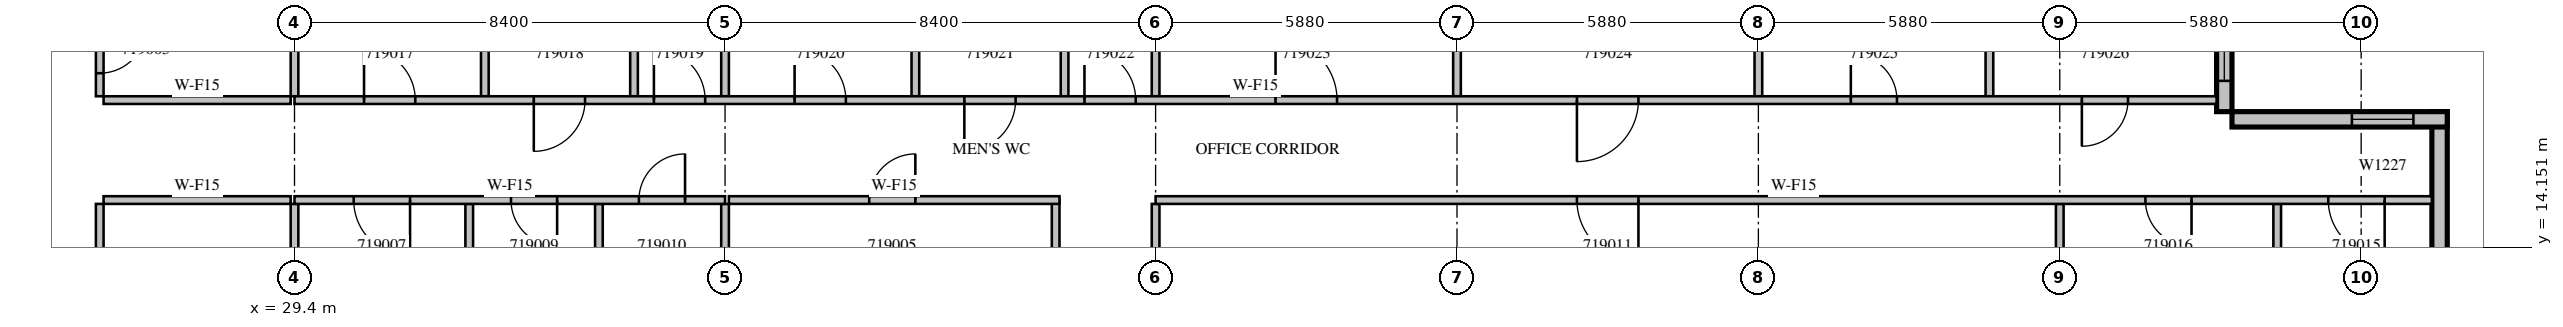
"""IFC4 building model, lengths in metres.
Left out: names, types, materials, properties, quantities, classifications, styles, units other than length and angle.
Written with IfcOpenShell. Run it as: python <this file> out.ifc"""

import sys

from ifc_helpers import new_model, si_unit, direction, frame, frame_2d, origin, place, context, subcontext, project, spatial, rectangle, extrude, source, transform, mapped, element, fill, save


model = new_model("IFC4")
c1 = context("Model", 3, precision=1e-05, world=origin(), true_north=direction((0.0, 1.0)))
c2 = subcontext(c1, "Body", "Model", "MODEL_VIEW")
j1 = project(units=[si_unit("LENGTHUNIT", "METRE"), si_unit("PLANEANGLEUNIT", "RADIAN")], contexts=[c1])
p1 = place(None, origin())
s1 = spatial("IfcSite", under=j1, at=p1, CompositionType="ELEMENT")
p2 = place(p1, origin())
s2 = spatial("IfcBuilding", under=s1, at=p2, CompositionType="ELEMENT")
p3 = place(p2, frame((0.0, 0.0, 90.9)))
s3 = spatial("IfcBuildingStorey", under=s2, at=p3, CompositionType="ELEMENT", Elevation=90.9)
m1 = source(origin(), c2, "Body", "SweptSolid", [
    extrude(rectangle(XDim=6.3, YDim=0.3, at=frame_2d((3.15, 0.0))), origin(), (0.0, 0.0, 1.0), 3.8),
])
p4 = place(p3, frame((71.25, 10.5, 0.0), z_axis=(0.0, 0.0, 1.0), x_axis=(0.0, 1.0, 0.0)))
e1 = element("IfcWall", 1, at=p4, inside=s3, PredefinedType="STANDARD", context=c2, shape_type="MappedRepresentation", body=[
    mapped(m1, transform((0.0, 0.0, 0.0), scale=1.0)),
])
m2 = source(origin(), c2, "Body", "SweptSolid", [
    extrude(rectangle(XDim=1.2, YDim=2.7, at=frame_2d((0.6, 1.35))), frame((0.0, 0.16, 0.0), z_axis=(0.0, -1.0, 0.0), x_axis=(1.0, 0.0, 0.0)), (0.0, 0.0, 1.0), 0.32),
])
p5 = place(p4, frame((1.062, 0.0, 0.6)))
e2 = element("IfcOpeningElement", 2, at=p5, cuts=e1, PredefinedType="OPENING", context=c2, shape_type="MappedRepresentation", body=[
    mapped(m2, transform((0.0, 0.0, 0.0), scale=1.0)),
])
m3 = source(origin(), c2, "Body", "SweptSolid", [
    extrude(rectangle(XDim=4.2, YDim=0.3, at=frame_2d((2.1, 0.0))), origin(), (0.0, 0.0, 1.0), 3.8),
])
p6 = place(p3, frame((71.4, 16.65, 0.0), z_axis=(0.0, 0.0, 1.0), x_axis=(-1.0, 0.0, 0.0)))
e3 = element("IfcWall", 3, at=p6, inside=s3, PredefinedType="STANDARD", context=c2, shape_type="MappedRepresentation", body=[
    mapped(m3, transform((0.0, 0.0, 0.0), scale=1.0)),
])
p7 = place(p6, frame((0.66, 0.0, 0.6)))
e4 = element("IfcOpeningElement", 4, at=p7, cuts=e3, PredefinedType="OPENING", context=c2, shape_type="MappedRepresentation", body=[
    mapped(m2, transform((0.0, 0.0, 0.0), scale=1.0)),
])
p8 = place(p3, frame((67.05, 16.8, 0.0), z_axis=(0.0, 0.0, 1.0), x_axis=(0.0, 1.0, 0.0)))
e5 = element("IfcWall", 5, at=p8, inside=s3, PredefinedType="STANDARD", context=c2, shape_type="MappedRepresentation", body=[
    mapped(m3, transform((0.0, 0.0, 0.0), scale=1.0)),
])
m4 = source(origin(), c2, "Body", "SweptSolid", [
    extrude(rectangle(XDim=3.0, YDim=2.7, at=frame_2d((1.5, 1.35))), frame((0.0, 0.16, 0.0), z_axis=(0.0, -1.0, 0.0), x_axis=(1.0, 0.0, 0.0)), (0.0, 0.0, 1.0), 0.32),
])
p9 = place(p8, frame((0.6, 0.0, 0.6)))
e6 = element("IfcOpeningElement", 6, at=p9, cuts=e5, PredefinedType="OPENING", context=c2, shape_type="MappedRepresentation", body=[
    mapped(m4, transform((0.0, 0.0, 0.0), scale=1.0)),
])
m5 = source(origin(), c2, "Body", "SweptSolid", [
    extrude(rectangle(XDim=11.925, YDim=0.15, at=frame_2d((5.963, 0.0))), origin(), (0.0, 0.0, 1.0), 3.8),
])
p10 = place(p3, frame((25.6, 15.0, 0.0), z_axis=(0.0, 0.0, 1.0), x_axis=(0.0, -1.0, 0.0)))
e7 = element("IfcWall", 7, at=p10, inside=s3, PredefinedType="PARTITIONING", context=c2, shape_type="MappedRepresentation", body=[
    mapped(m5, transform((0.0, 0.0, 0.0), scale=1.0)),
])
m6 = source(origin(), c2, "Body", "SweptSolid", [
    extrude(rectangle(XDim=0.9, YDim=2.1, at=frame_2d((0.45, 1.05))), frame((0.0, 0.085, 0.0), z_axis=(0.0, -1.0, 0.0), x_axis=(1.0, 0.0, 0.0)), (0.0, 0.0, 1.0), 0.17),
])
p11 = place(p10, frame((7.763, 0.0, 0.0)))
e8 = element("IfcOpeningElement", 8, at=p11, cuts=e7, PredefinedType="OPENING", context=c2, shape_type="MappedRepresentation", body=[
    mapped(m6, transform((0.0, 0.0, 0.0), scale=1.0)),
])
p12 = place(p10, frame((0.925, 0.0, 0.0)))
e9 = element("IfcOpeningElement", 9, at=p12, cuts=e7, PredefinedType="OPENING", context=c2, shape_type="MappedRepresentation", body=[
    mapped(m6, transform((0.0, 0.0, 0.0), scale=1.0)),
])
m7 = source(origin(), c2, "Body", "SweptSolid", [
    extrude(rectangle(XDim=3.6, YDim=0.15, at=frame_2d((1.8, 0.0))), origin(), (0.0, 0.0, 1.0), 3.8),
])
p13 = place(p3, frame((25.6, 20.7, 0.0), z_axis=(0.0, 0.0, 1.0), x_axis=(0.0, -1.0, 0.0)))
e10 = element("IfcWall", 10, at=p13, inside=s3, PredefinedType="PARTITIONING", context=c2, shape_type="MappedRepresentation", body=[
    mapped(m7, transform((0.0, 0.0, 0.0), scale=1.0)),
])
p14 = place(p13, frame((2.25, 0.0, 0.0)))
e11 = element("IfcOpeningElement", 11, at=p14, cuts=e10, PredefinedType="OPENING", context=c2, shape_type="MappedRepresentation", body=[
    mapped(m6, transform((0.0, 0.0, 0.0), scale=1.0)),
])
m8 = source(origin(), c2, "Body", "SweptSolid", [
    extrude(rectangle(XDim=3.65, YDim=0.15, at=frame_2d((1.825, 0.0))), origin(), (0.0, 0.0, 1.0), 3.8),
])
for number, where, z_axis, x_axis in (
    (12, (29.325, 15.075, 0.0), (0.0, 0.0, 1.0), (-1.0, 0.0, 0.0)),
    (13, (25.675, 17.025, 0.0), (0.0, 0.0, 1.0), (1.0, 0.0, 0.0)),
):
    element("IfcWall", number, at=place(p3, frame(where, z_axis=z_axis, x_axis=x_axis)), inside=s3, PredefinedType="PARTITIONING", context=c2, shape_type="MappedRepresentation", body=[
        mapped(m8, transform((0.0, 0.0, 0.0), scale=1.0)),
    ])
m9 = source(origin(), c2, "Body", "SweptSolid", [
    extrude(rectangle(XDim=3.901, YDim=0.15, at=frame_2d((1.95, 0.0))), origin(), (0.0, 0.0, 1.0), 3.8),
])
p15 = place(p3, frame((29.4, 11.099, 0.0), z_axis=(0.0, 0.0, 1.0), x_axis=(0.0, 1.0, 0.0)))
e14 = element("IfcWall", 14, at=p15, inside=s3, PredefinedType="PARTITIONING", context=c2, shape_type="MappedRepresentation", body=[
    mapped(m9, transform((0.0, 0.0, 0.0), scale=1.0)),
])
m10 = source(origin(), c2, "Body", "SweptSolid", [
    extrude(rectangle(XDim=2.701, YDim=0.15, at=frame_2d((1.351, 0.0))), origin(), (0.0, 0.0, 1.0), 3.8),
])
p16 = place(p3, frame((29.4, 17.1, 0.0), z_axis=(0.0, 0.0, 1.0), x_axis=(0.0, 1.0, 0.0)))
e15 = element("IfcWall", 15, at=p16, inside=s3, PredefinedType="PARTITIONING", context=c2, shape_type="MappedRepresentation", body=[
    mapped(m10, transform((0.0, 0.0, 0.0), scale=1.0)),
])
m11 = source(origin(), c2, "Body", "SweptSolid", [
    extrude(rectangle(XDim=3.175, YDim=0.15, at=frame_2d((1.587, 0.0))), origin(), (0.0, 0.0, 1.0), 3.8),
])
p17 = place(p3, frame((44.25, 11.9, 0.0), z_axis=(0.0, 0.0, 1.0), x_axis=(0.0, 1.0, 0.0)))
e16 = element("IfcWall", 16, at=p17, inside=s3, PredefinedType="PARTITIONING", context=c2, shape_type="MappedRepresentation", body=[
    mapped(m11, transform((0.0, 0.0, 0.0), scale=1.0)),
])
m12 = source(origin(), c2, "Body", "SweptSolid", [
    extrude(rectangle(XDim=6.45, YDim=0.15, at=frame_2d((3.225, 0.0))), origin(), (0.0, 0.0, 1.0), 3.8),
])
p18 = place(p3, frame((44.325, 15.075, 0.0), z_axis=(0.0, 0.0, 1.0), x_axis=(-1.0, 0.0, 0.0)))
e17 = element("IfcWall", 17, at=p18, inside=s3, PredefinedType="PARTITIONING", context=c2, shape_type="MappedRepresentation", body=[
    mapped(m12, transform((0.0, 0.0, 0.0), scale=1.0)),
])
p19 = place(p18, frame((2.812, 0.0, 0.0)))
e18 = element("IfcOpeningElement", 18, at=p19, cuts=e17, PredefinedType="OPENING", context=c2, shape_type="MappedRepresentation", body=[
    mapped(m6, transform((0.0, 0.0, 0.0), scale=1.0)),
])
m13 = source(origin(), c2, "Body", "SweptSolid", [
    extrude(rectangle(XDim=3.75, YDim=0.15, at=frame_2d((1.875, 0.0))), origin(), (0.0, 0.0, 1.0), 3.8),
])
for number, where, z_axis, x_axis in (
    (19, (32.809, 11.25, 0.0), (0.0, 0.0, 1.0), (0.0, 1.0, 0.0)),
    (20, (35.339, 11.25, 0.0), (0.0, 0.0, 1.0), (0.0, 1.0, 0.0)),
    (21, (37.8, 11.25, 0.0), (0.0, 0.0, 1.0), (0.0, 1.0, 0.0)),
    (22, (68.082, 11.25, 0.0), (0.0, 0.0, 1.0), (0.0, 1.0, 0.0)),
    (23, (46.2, 11.25, 0.0), (0.0, 0.0, 1.0), (0.0, 1.0, 0.0)),
    (24, (63.84, 11.25, 0.0), (0.0, 0.0, 1.0), (0.0, 1.0, 0.0)),
):
    element("IfcWall", number, at=place(p3, frame(where, z_axis=z_axis, x_axis=x_axis)), inside=s3, PredefinedType="PARTITIONING", context=c2, shape_type="MappedRepresentation", body=[
        mapped(m13, transform((0.0, 0.0, 0.0), scale=1.0)),
    ])
for number, where, z_axis, x_axis in (
    (25, (33.113, 20.7, 0.0), (0.0, 0.0, 1.0), (0.0, -1.0, 0.0)),
    (26, (36.024, 20.7, 0.0), (0.0, 0.0, 1.0), (0.0, -1.0, 0.0)),
    (27, (41.513, 20.7, 0.0), (0.0, 0.0, 1.0), (0.0, -1.0, 0.0)),
):
    element("IfcWall", number, at=place(p3, frame(where, z_axis=z_axis, x_axis=x_axis)), inside=s3, PredefinedType="PARTITIONING", context=c2, shape_type="MappedRepresentation", body=[
        mapped(m7, transform((0.0, 0.0, 0.0), scale=1.0)),
    ])
p20 = place(p3, frame((44.424, 18.695, 0.0), z_axis=(0.0, 0.0, 1.0), x_axis=(0.0, -1.0, 0.0)))
e28 = element("IfcWall", 28, at=p20, inside=s3, PredefinedType="PARTITIONING", context=c2, shape_type="SweptSolid", body=[
    extrude(rectangle(XDim=1.595, YDim=0.15, at=frame_2d((0.797, 0.0))), origin(), (0.0, 0.0, 1.0), 3.8),
])
p21 = place(p3, frame((52.08, 19.801, 0.0), z_axis=(0.0, 0.0, 1.0), x_axis=(0.0, -1.0, 0.0)))
e29 = element("IfcWall", 29, at=p21, inside=s3, PredefinedType="PARTITIONING", context=c2, shape_type="MappedRepresentation", body=[
    mapped(m10, transform((0.0, 0.0, 0.0), scale=1.0)),
])
p22 = place(p3, frame((62.468, 20.7, 0.0), z_axis=(0.0, 0.0, 1.0), x_axis=(0.0, -1.0, 0.0)))
e30 = element("IfcWall", 30, at=p22, inside=s3, PredefinedType="PARTITIONING", context=c2, shape_type="MappedRepresentation", body=[
    mapped(m7, transform((0.0, 0.0, 0.0), scale=1.0)),
])
for number, where, z_axis, x_axis in (
    (31, (37.8, 17.1, 0.0), (0.0, 0.0, 1.0), (0.0, 1.0, 0.0)),
    (32, (46.2, 17.1, 0.0), (0.0, 0.0, 1.0), (0.0, 1.0, 0.0)),
    (33, (57.96, 17.1, 0.0), (0.0, 0.0, 1.0), (0.0, 1.0, 0.0)),
):
    element("IfcWall", number, at=place(p3, frame(where, z_axis=z_axis, x_axis=x_axis)), inside=s3, PredefinedType="PARTITIONING", context=c2, shape_type="MappedRepresentation", body=[
        mapped(m10, transform((0.0, 0.0, 0.0), scale=1.0)),
    ])
m14 = source(origin(), c2, "Body", "SweptSolid", [
    extrude(rectangle(XDim=8.4, YDim=0.15, at=frame_2d((4.2, 0.0))), origin(), (0.0, 0.0, 1.0), 3.8),
])
p23 = place(p3, frame((37.8, 15.075, 0.0), z_axis=(0.0, 0.0, 1.0), x_axis=(-1.0, 0.0, 0.0)))
e34 = element("IfcWall", 34, at=p23, inside=s3, PredefinedType="PARTITIONING", context=c2, shape_type="MappedRepresentation", body=[
    mapped(m14, transform((0.0, 0.0, 0.0), scale=1.0)),
])
m15 = source(origin(), c2, "Body", "SweptSolid", [
    extrude(rectangle(XDim=1.1, YDim=2.1, at=frame_2d((0.55, 1.05))), frame((0.0, 0.085, 0.0), z_axis=(0.0, -1.0, 0.0), x_axis=(1.0, 0.0, 0.0)), (0.0, 0.0, 1.0), 0.17),
])
p24 = place(p23, frame((6.146, 0.0, 0.0)))
e35 = element("IfcOpeningElement", 35, at=p24, cuts=e34, PredefinedType="OPENING", context=c2, shape_type="MappedRepresentation", body=[
    mapped(m15, transform((0.0, 0.0, 0.0), scale=1.0)),
])
p25 = place(p23, frame((3.276, 0.0, 0.0)))
e36 = element("IfcOpeningElement", 36, at=p25, cuts=e34, PredefinedType="OPENING", context=c2, shape_type="MappedRepresentation", body=[
    mapped(m6, transform((0.0, 0.0, 0.0), scale=1.0)),
])
p26 = place(p23, frame((0.781, 0.0, 0.0)))
e37 = element("IfcOpeningElement", 37, at=p26, cuts=e34, PredefinedType="OPENING", context=c2, shape_type="MappedRepresentation", body=[
    mapped(m6, transform((0.0, 0.0, 0.0), scale=1.0)),
])
m16 = source(origin(), c2, "Body", "SweptSolid", [
    extrude(rectangle(XDim=24.9, YDim=0.15, at=frame_2d((12.45, 0.0))), origin(), (0.0, 0.0, 1.0), 3.8),
])
p27 = place(p3, frame((71.1, 15.075, 0.0), z_axis=(0.0, 0.0, 1.0), x_axis=(-1.0, 0.0, 0.0)))
e38 = element("IfcWall", 38, at=p27, inside=s3, PredefinedType="PARTITIONING", context=c2, shape_type="MappedRepresentation", body=[
    mapped(m16, transform((0.0, 0.0, 0.0), scale=1.0)),
])
m17 = source(origin(), c2, "Body", "SweptSolid", [
    extrude(rectangle(XDim=1.2, YDim=2.1, at=frame_2d((0.6, 1.05))), frame((0.0, 0.085, 0.0), z_axis=(0.0, -1.0, 0.0), x_axis=(1.0, 0.0, 0.0)), (0.0, 0.0, 1.0), 0.17),
])
p28 = place(p27, frame((15.48, 0.0, 0.0)))
e39 = element("IfcOpeningElement", 39, at=p28, cuts=e38, PredefinedType="OPENING", context=c2, shape_type="MappedRepresentation", body=[
    mapped(m17, transform((0.0, 0.0, 0.0), scale=1.0)),
])
p29 = place(p27, frame((0.921, 0.0, 0.0)))
e40 = element("IfcOpeningElement", 40, at=p29, cuts=e38, PredefinedType="OPENING", context=c2, shape_type="MappedRepresentation", body=[
    mapped(m15, transform((0.0, 0.0, 0.0), scale=1.0)),
])
p30 = place(p27, frame((4.689, 0.0, 0.0)))
e41 = element("IfcOpeningElement", 41, at=p30, cuts=e38, PredefinedType="OPENING", context=c2, shape_type="MappedRepresentation", body=[
    mapped(m6, transform((0.0, 0.0, 0.0), scale=1.0)),
])
m18 = source(origin(), c2, "Body", "SweptSolid", [
    extrude(rectangle(XDim=37.5, YDim=0.15, at=frame_2d((18.75, 0.0))), origin(), (0.0, 0.0, 1.0), 3.8),
])
p31 = place(p3, frame((29.4, 17.025, 0.0), z_axis=(0.0, 0.0, 1.0), x_axis=(1.0, 0.0, 0.0)))
e42 = element("IfcWall", 42, at=p31, inside=s3, PredefinedType="PARTITIONING", context=c2, shape_type="MappedRepresentation", body=[
    mapped(m18, transform((0.0, 0.0, 0.0), scale=1.0)),
])
m19 = source(origin(), c2, "Body", "SweptSolid", [
    extrude(rectangle(XDim=1.0, YDim=2.1, at=frame_2d((0.5, 1.05))), frame((0.0, 0.085, 0.0), z_axis=(0.0, -1.0, 0.0), x_axis=(1.0, 0.0, 0.0)), (0.0, 0.0, 1.0), 0.17),
])
p32 = place(p31, frame((1.357, 0.0, 0.0)))
e43 = element("IfcOpeningElement", 43, at=p32, cuts=e42, PredefinedType="OPENING", context=c2, shape_type="MappedRepresentation", body=[
    mapped(m19, transform((0.0, 0.0, 0.0), scale=1.0)),
])
p33 = place(p31, frame((4.669, 0.0, 0.0)))
e44 = element("IfcOpeningElement", 44, at=p33, cuts=e42, PredefinedType="OPENING", context=c2, shape_type="MappedRepresentation", body=[
    mapped(m19, transform((0.0, 0.0, 0.0), scale=1.0)),
])
p34 = place(p31, frame((7.012, 0.0, 0.0)))
e45 = element("IfcOpeningElement", 45, at=p34, cuts=e42, PredefinedType="OPENING", context=c2, shape_type="MappedRepresentation", body=[
    mapped(m19, transform((0.0, 0.0, 0.0), scale=1.0)),
])
p35 = place(p31, frame((9.757, 0.0, 0.0)))
e46 = element("IfcOpeningElement", 46, at=p35, cuts=e42, PredefinedType="OPENING", context=c2, shape_type="MappedRepresentation", body=[
    mapped(m19, transform((0.0, 0.0, 0.0), scale=1.0)),
])
p36 = place(p31, frame((13.069, 0.0, 0.0)))
e47 = element("IfcOpeningElement", 47, at=p36, cuts=e42, PredefinedType="OPENING", context=c2, shape_type="MappedRepresentation", body=[
    mapped(m19, transform((0.0, 0.0, 0.0), scale=1.0)),
])
p37 = place(p31, frame((15.412, 0.0, 0.0)))
e48 = element("IfcOpeningElement", 48, at=p37, cuts=e42, PredefinedType="OPENING", context=c2, shape_type="MappedRepresentation", body=[
    mapped(m19, transform((0.0, 0.0, 0.0), scale=1.0)),
])
p38 = place(p31, frame((19.14, 0.0, 0.0)))
e49 = element("IfcOpeningElement", 49, at=p38, cuts=e42, PredefinedType="OPENING", context=c2, shape_type="MappedRepresentation", body=[
    mapped(m17, transform((0.0, 0.0, 0.0), scale=1.0)),
])
p39 = place(p31, frame((25.02, 0.0, 0.0)))
e50 = element("IfcOpeningElement", 50, at=p39, cuts=e42, PredefinedType="OPENING", context=c2, shape_type="MappedRepresentation", body=[
    mapped(m17, transform((0.0, 0.0, 0.0), scale=1.0)),
])
p40 = place(p31, frame((30.364, 0.0, 0.0)))
e51 = element("IfcOpeningElement", 51, at=p40, cuts=e42, PredefinedType="OPENING", context=c2, shape_type="MappedRepresentation", body=[
    mapped(m6, transform((0.0, 0.0, 0.0), scale=1.0)),
])
p41 = place(p31, frame((34.871, 0.0, 0.0)))
e52 = element("IfcOpeningElement", 52, at=p41, cuts=e42, PredefinedType="OPENING", context=c2, shape_type="MappedRepresentation", body=[
    mapped(m6, transform((0.0, 0.0, 0.0), scale=1.0)),
])
m20 = source(origin(), c2, "Body", "SweptSolid", [
    extrude(rectangle(XDim=1.2, YDim=2.7, at=frame_2d((0.6, 1.35))), frame((0.0, 0.03, 0.0), z_axis=(0.0, -1.0, 0.0), x_axis=(1.0, 0.0, 0.0)), (0.0, 0.0, 1.0), 0.06),
])
p42 = place(p7, origin())
e53 = element("IfcWindow", 53, at=p42, inside=s3, PartitioningType="SINGLE_PANEL", PredefinedType="WINDOW", context=c2, shape_type="MappedRepresentation", body=[
    mapped(m20, transform((0.0, 0.0, 0.0), scale=1.0)),
])
fill(e4, e53)
m21 = source(origin(), c2, "Body", "SweptSolid", [
    extrude(rectangle(XDim=3.0, YDim=2.7, at=frame_2d((1.5, 1.35))), frame((0.0, 0.03, 0.0), z_axis=(0.0, -1.0, 0.0), x_axis=(1.0, 0.0, 0.0)), (0.0, 0.0, 1.0), 0.06),
])
p43 = place(p9, origin())
e54 = element("IfcWindow", 54, at=p43, inside=s3, PartitioningType="SINGLE_PANEL", PredefinedType="WINDOW", context=c2, shape_type="MappedRepresentation", body=[
    mapped(m21, transform((0.0, 0.0, 0.0), scale=1.0)),
])
fill(e6, e54)
m22 = source(origin(), c2, "Body", "SweptSolid", [
    extrude(rectangle(XDim=0.9, YDim=2.1, at=frame_2d((0.45, 1.05))), frame((0.0, 0.025, 0.0), z_axis=(0.0, -1.0, 0.0), x_axis=(1.0, 0.0, 0.0)), (0.0, 0.0, 1.0), 0.05),
])
p44 = place(p14, origin())
e55 = element("IfcDoor", 55, at=p44, inside=s3, OperationType="SINGLE_SWING_LEFT", PredefinedType="DOOR", context=c2, shape_type="MappedRepresentation", body=[
    mapped(m22, transform((0.0, 0.0, 0.0), scale=1.0)),
])
fill(e11, e55)
p45 = place(p19, origin())
e56 = element("IfcDoor", 56, at=p45, inside=s3, OperationType="SINGLE_SWING_RIGHT", PredefinedType="DOOR", context=c2, shape_type="MappedRepresentation", body=[
    mapped(m22, transform((0.0, 0.0, 0.0), scale=1.0)),
])
fill(e18, e56)
m23 = source(origin(), c2, "Body", "SweptSolid", [
    extrude(rectangle(XDim=1.1, YDim=2.1, at=frame_2d((0.55, 1.05))), frame((0.0, 0.025, 0.0), z_axis=(0.0, -1.0, 0.0), x_axis=(1.0, 0.0, 0.0)), (0.0, 0.0, 1.0), 0.05),
])
p46 = place(p24, origin())
e57 = element("IfcDoor", 57, at=p46, inside=s3, OperationType="SINGLE_SWING_LEFT", PredefinedType="DOOR", context=c2, shape_type="MappedRepresentation", body=[
    mapped(m23, transform((0.0, 0.0, 0.0), scale=1.0)),
])
fill(e35, e57)
p47 = place(p25, origin())
e58 = element("IfcDoor", 58, at=p47, inside=s3, OperationType="SINGLE_SWING_LEFT", PredefinedType="DOOR", context=c2, shape_type="MappedRepresentation", body=[
    mapped(m22, transform((0.0, 0.0, 0.0), scale=1.0)),
])
fill(e36, e58)
p48 = place(p26, origin())
e59 = element("IfcDoor", 59, at=p48, inside=s3, OperationType="SINGLE_SWING_RIGHT", PredefinedType="DOOR", context=c2, shape_type="MappedRepresentation", body=[
    mapped(m22, transform((0.0, 0.0, 0.0), scale=1.0)),
])
fill(e37, e59)
m24 = source(origin(), c2, "Body", "SweptSolid", [
    extrude(rectangle(XDim=1.2, YDim=2.1, at=frame_2d((0.6, 1.05))), frame((0.0, 0.025, 0.0), z_axis=(0.0, -1.0, 0.0), x_axis=(1.0, 0.0, 0.0)), (0.0, 0.0, 1.0), 0.05),
])
p49 = place(p28, origin())
e60 = element("IfcDoor", 60, at=p49, inside=s3, OperationType="SINGLE_SWING_LEFT", PredefinedType="DOOR", context=c2, shape_type="MappedRepresentation", body=[
    mapped(m24, transform((0.0, 0.0, 0.0), scale=1.0)),
])
fill(e39, e60)
p50 = place(p29, origin())
e61 = element("IfcDoor", 61, at=p50, inside=s3, OperationType="SINGLE_SWING_LEFT", PredefinedType="DOOR", context=c2, shape_type="MappedRepresentation", body=[
    mapped(m23, transform((0.0, 0.0, 0.0), scale=1.0)),
])
fill(e40, e61)
p51 = place(p30, origin())
e62 = element("IfcDoor", 62, at=p51, inside=s3, OperationType="SINGLE_SWING_LEFT", PredefinedType="DOOR", context=c2, shape_type="MappedRepresentation", body=[
    mapped(m22, transform((0.0, 0.0, 0.0), scale=1.0)),
])
fill(e41, e62)
m25 = source(origin(), c2, "Body", "SweptSolid", [
    extrude(rectangle(XDim=1.0, YDim=2.1, at=frame_2d((0.5, 1.05))), frame((0.0, 0.025, 0.0), z_axis=(0.0, -1.0, 0.0), x_axis=(1.0, 0.0, 0.0)), (0.0, 0.0, 1.0), 0.05),
])
p52 = place(p32, origin())
e63 = element("IfcDoor", 63, at=p52, inside=s3, OperationType="SINGLE_SWING_LEFT", PredefinedType="DOOR", context=c2, shape_type="MappedRepresentation", body=[
    mapped(m25, transform((0.0, 0.0, 0.0), scale=1.0)),
])
fill(e43, e63)
p53 = place(p33, origin())
e64 = element("IfcDoor", 64, at=p53, inside=s3, OperationType="SINGLE_SWING_RIGHT", PredefinedType="DOOR", context=c2, shape_type="MappedRepresentation", body=[
    mapped(m25, transform((0.0, 0.0, 0.0), scale=1.0)),
])
fill(e44, e64)
p54 = place(p34, origin())
e65 = element("IfcDoor", 65, at=p54, inside=s3, OperationType="SINGLE_SWING_LEFT", PredefinedType="DOOR", context=c2, shape_type="MappedRepresentation", body=[
    mapped(m25, transform((0.0, 0.0, 0.0), scale=1.0)),
])
fill(e45, e65)
p55 = place(p35, origin())
e66 = element("IfcDoor", 66, at=p55, inside=s3, OperationType="SINGLE_SWING_LEFT", PredefinedType="DOOR", context=c2, shape_type="MappedRepresentation", body=[
    mapped(m25, transform((0.0, 0.0, 0.0), scale=1.0)),
])
fill(e46, e66)
p56 = place(p36, origin())
e67 = element("IfcDoor", 67, at=p56, inside=s3, OperationType="SINGLE_SWING_RIGHT", PredefinedType="DOOR", context=c2, shape_type="MappedRepresentation", body=[
    mapped(m25, transform((0.0, 0.0, 0.0), scale=1.0)),
])
fill(e47, e67)
p57 = place(p37, origin())
e68 = element("IfcDoor", 68, at=p57, inside=s3, OperationType="SINGLE_SWING_LEFT", PredefinedType="DOOR", context=c2, shape_type="MappedRepresentation", body=[
    mapped(m25, transform((0.0, 0.0, 0.0), scale=1.0)),
])
fill(e48, e68)
p58 = place(p38, origin())
e69 = element("IfcDoor", 69, at=p58, inside=s3, OperationType="SINGLE_SWING_LEFT", PredefinedType="DOOR", context=c2, shape_type="MappedRepresentation", body=[
    mapped(m24, transform((0.0, 0.0, 0.0), scale=1.0)),
])
fill(e49, e69)
p59 = place(p39, origin())
e70 = element("IfcDoor", 70, at=p59, inside=s3, OperationType="SINGLE_SWING_RIGHT", PredefinedType="DOOR", context=c2, shape_type="MappedRepresentation", body=[
    mapped(m24, transform((0.0, 0.0, 0.0), scale=1.0)),
])
fill(e50, e70)
p60 = place(p40, origin())
e71 = element("IfcDoor", 71, at=p60, inside=s3, OperationType="SINGLE_SWING_LEFT", PredefinedType="DOOR", context=c2, shape_type="MappedRepresentation", body=[
    mapped(m22, transform((0.0, 0.0, 0.0), scale=1.0)),
])
fill(e51, e71)
p61 = place(p41, origin())
e72 = element("IfcDoor", 72, at=p61, inside=s3, OperationType="SINGLE_SWING_RIGHT", PredefinedType="DOOR", context=c2, shape_type="MappedRepresentation", body=[
    mapped(m22, transform((0.0, 0.0, 0.0), scale=1.0)),
])
fill(e52, e72)
save(model, sys.argv[1])
